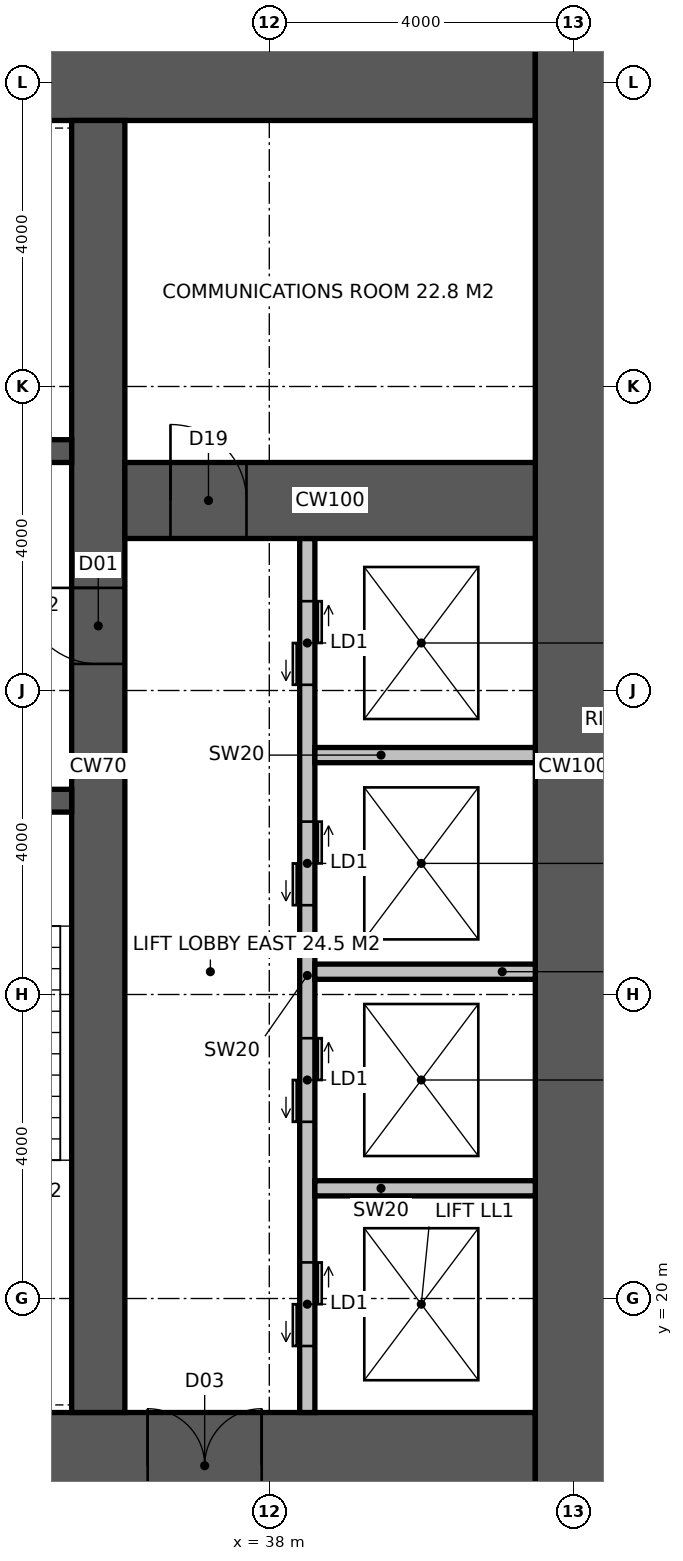
"""IFC4 building model, lengths in metres.
Left out: names, types, materials, properties, quantities, classifications, styles, units other than length and angle.
Written with IfcOpenShell. Run it as: python <this file> out.ifc"""

import sys

from ifc_helpers import new_model, si_unit, direction, frame, frame_2d, origin, place, context, subcontext, project, spatial, rectangle, extrude, element, fill, save


model = new_model("IFC4")
c1 = context("Model", 3, precision=1e-05, world=origin(), true_north=direction((0.0, 1.0)))
c2 = subcontext(c1, "Body", "Model", "MODEL_VIEW")
j1 = project(units=[si_unit("LENGTHUNIT", "METRE"), si_unit("PLANEANGLEUNIT", "RADIAN")], contexts=[c1])
p1 = place(None, origin())
s1 = spatial("IfcSite", under=j1, at=p1, CompositionType="ELEMENT")
p2 = place(p1, origin())
s2 = spatial("IfcBuilding", under=s1, at=p2, CompositionType="ELEMENT")
p3 = place(p2, frame((0.0, 0.0, 27.0)))
s3 = spatial("IfcBuildingStorey", under=s2, at=p3, CompositionType="ELEMENT", Elevation=27.0)
p4 = place(p3, frame((18.5, 17.8, -0.15), z_axis=(0.0, 0.0, 1.0), x_axis=(1.0, 0.0, 0.0)))
e1 = element("IfcWall", 1, at=p4, inside=s3, PredefinedType="SHEAR", context=c2, shape_type="SweptSolid", body=[
    extrude(rectangle(XDim=23.0, YDim=1.4, at=frame_2d((11.5, 0.0))), origin(), (0.0, 0.0, 1.0), 4.0),
])
p5 = place(p4, frame((3.45, 0.0, 0.15)))
e2 = element("IfcOpeningElement", 2, at=p5, cuts=e1, PredefinedType="OPENING", context=c2, shape_type="SweptSolid", body=[
    extrude(rectangle(XDim=1.5, YDim=2.4, at=frame_2d((0.75, 1.2))), frame((0.0, 0.71, 0.0), z_axis=(0.0, -1.0, 0.0), x_axis=(1.0, 0.0, 0.0)), (0.0, 0.0, 1.0), 1.42),
])
p6 = place(p4, frame((17.9, 0.0, 0.15)))
e3 = element("IfcOpeningElement", 3, at=p6, cuts=e1, PredefinedType="OPENING", context=c2, shape_type="SweptSolid", body=[
    extrude(rectangle(XDim=1.5, YDim=2.4, at=frame_2d((0.75, 1.2))), frame((0.0, 0.71, 0.0), z_axis=(0.0, -1.0, 0.0), x_axis=(1.0, 0.0, 0.0)), (0.0, 0.0, 1.0), 1.42),
])
p7 = place(p4, frame((0.9, 0.0, 0.15)))
e4 = element("IfcOpeningElement", 4, at=p7, cuts=e1, PredefinedType="OPENING", context=c2, shape_type="SweptSolid", body=[
    extrude(rectangle(XDim=1.0, YDim=2.2, at=frame_2d((0.5, 1.1))), frame((0.0, 0.71, 0.0), z_axis=(0.0, -1.0, 0.0), x_axis=(1.0, 0.0, 0.0)), (0.0, 0.0, 1.0), 1.42),
])
p8 = place(p3, frame((18.5, 36.2, -0.15), z_axis=(0.0, 0.0, 1.0), x_axis=(1.0, 0.0, 0.0)))
e5 = element("IfcWall", 5, at=p8, inside=s3, PredefinedType="SHEAR", context=c2, shape_type="SweptSolid", body=[
    extrude(rectangle(XDim=23.0, YDim=1.4, at=frame_2d((11.5, 0.0))), origin(), (0.0, 0.0, 1.0), 4.0),
])
p9 = place(p3, frame((42.0, 17.1, -0.15), z_axis=(0.0, 0.0, 1.0), x_axis=(0.0, 1.0, 0.0)))
e6 = element("IfcWall", 6, at=p9, inside=s3, PredefinedType="SHEAR", context=c2, shape_type="SweptSolid", body=[
    extrude(rectangle(XDim=19.8, YDim=1.0, at=frame_2d((9.9, 0.0))), origin(), (0.0, 0.0, 1.0), 4.0),
])
p10 = place(p3, frame((35.75, 18.5, -0.15), z_axis=(0.0, 0.0, 1.0), x_axis=(0.0, 1.0, 0.0)))
e7 = element("IfcWall", 7, at=p10, inside=s3, PredefinedType="SHEAR", context=c2, shape_type="SweptSolid", body=[
    extrude(rectangle(XDim=17.0, YDim=0.7, at=frame_2d((8.5, 0.0))), origin(), (0.0, 0.0, 1.0), 4.0),
])
p11 = place(p10, frame((9.85, 0.0, 0.15)))
e8 = element("IfcOpeningElement", 8, at=p11, cuts=e7, PredefinedType="OPENING", context=c2, shape_type="SweptSolid", body=[
    extrude(rectangle(XDim=1.0, YDim=2.2, at=frame_2d((0.5, 1.1))), frame((0.0, 0.36, 0.0), z_axis=(0.0, -1.0, 0.0), x_axis=(1.0, 0.0, 0.0)), (0.0, 0.0, 1.0), 0.72),
])
p12 = place(p3, frame((24.15, 26.55, -0.15), z_axis=(0.0, 0.0, 1.0), x_axis=(1.0, 0.0, 0.0)))
e9 = element("IfcWall", 9, at=p12, inside=s3, PredefinedType="SHEAR", context=c2, shape_type="SweptSolid", body=[
    extrude(rectangle(XDim=11.25, YDim=0.3, at=frame_2d((5.625, 0.0))), origin(), (0.0, 0.0, 1.0), 4.0),
])
p13 = place(p12, frame((9.25, 0.0, 0.15)))
e10 = element("IfcOpeningElement", 10, at=p13, cuts=e9, PredefinedType="OPENING", context=c2, shape_type="SweptSolid", body=[
    extrude(rectangle(XDim=1.0, YDim=2.2, at=frame_2d((0.5, 1.1))), frame((0.0, 0.16, 0.0), z_axis=(0.0, -1.0, 0.0), x_axis=(1.0, 0.0, 0.0)), (0.0, 0.0, 1.0), 0.32),
])
p14 = place(p12, frame((4.9, 0.0, 0.15)))
e11 = element("IfcOpeningElement", 11, at=p14, cuts=e9, PredefinedType="OPENING", context=c2, shape_type="SweptSolid", body=[
    extrude(rectangle(XDim=1.5, YDim=2.4, at=frame_2d((0.75, 1.2))), frame((0.0, 0.16, 0.0), z_axis=(0.0, -1.0, 0.0), x_axis=(1.0, 0.0, 0.0)), (0.0, 0.0, 1.0), 0.32),
])
p15 = place(p3, frame((24.15, 31.15, -0.15), z_axis=(0.0, 0.0, 1.0), x_axis=(1.0, 0.0, 0.0)))
e12 = element("IfcWall", 12, at=p15, inside=s3, PredefinedType="SHEAR", context=c2, shape_type="SweptSolid", body=[
    extrude(rectangle(XDim=11.25, YDim=0.3, at=frame_2d((5.625, 0.0))), origin(), (0.0, 0.0, 1.0), 4.0),
])
p16 = place(p15, frame((7.25, 0.0, 0.15)))
e13 = element("IfcOpeningElement", 13, at=p16, cuts=e12, PredefinedType="OPENING", context=c2, shape_type="SweptSolid", body=[
    extrude(rectangle(XDim=1.4, YDim=2.4, at=frame_2d((0.7, 1.2))), frame((0.0, 0.16, 0.0), z_axis=(0.0, -1.0, 0.0), x_axis=(1.0, 0.0, 0.0)), (0.0, 0.0, 1.0), 0.32),
])
p17 = place(p3, frame((38.5, 18.5, -0.15), z_axis=(0.0, 0.0, 1.0), x_axis=(0.0, 1.0, 0.0)))
e14 = element("IfcWall", 14, at=p17, inside=s3, PredefinedType="SOLIDWALL", context=c2, shape_type="SweptSolid", body=[
    extrude(rectangle(XDim=11.5, YDim=0.2, at=frame_2d((5.75, 0.0))), origin(), (0.0, 0.0, 1.0), 4.0),
])
p18 = place(p17, frame((0.875, 0.0, 0.15)))
e15 = element("IfcOpeningElement", 15, at=p18, cuts=e14, PredefinedType="OPENING", context=c2, shape_type="SweptSolid", body=[
    extrude(rectangle(XDim=1.1, YDim=2.2, at=frame_2d((0.55, 1.1))), frame((0.0, 0.11, 0.0), z_axis=(0.0, -1.0, 0.0), x_axis=(1.0, 0.0, 0.0)), (0.0, 0.0, 1.0), 0.22),
])
p19 = place(p17, frame((3.825, 0.0, 0.15)))
e16 = element("IfcOpeningElement", 16, at=p19, cuts=e14, PredefinedType="OPENING", context=c2, shape_type="SweptSolid", body=[
    extrude(rectangle(XDim=1.1, YDim=2.2, at=frame_2d((0.55, 1.1))), frame((0.0, 0.11, 0.0), z_axis=(0.0, -1.0, 0.0), x_axis=(1.0, 0.0, 0.0)), (0.0, 0.0, 1.0), 0.22),
])
p20 = place(p17, frame((6.675, 0.0, 0.15)))
e17 = element("IfcOpeningElement", 17, at=p20, cuts=e14, PredefinedType="OPENING", context=c2, shape_type="SweptSolid", body=[
    extrude(rectangle(XDim=1.1, YDim=2.2, at=frame_2d((0.55, 1.1))), frame((0.0, 0.11, 0.0), z_axis=(0.0, -1.0, 0.0), x_axis=(1.0, 0.0, 0.0)), (0.0, 0.0, 1.0), 0.22),
])
p21 = place(p17, frame((9.575, 0.0, 0.15)))
e18 = element("IfcOpeningElement", 18, at=p21, cuts=e14, PredefinedType="OPENING", context=c2, shape_type="SweptSolid", body=[
    extrude(rectangle(XDim=1.1, YDim=2.2, at=frame_2d((0.55, 1.1))), frame((0.0, 0.11, 0.0), z_axis=(0.0, -1.0, 0.0), x_axis=(1.0, 0.0, 0.0)), (0.0, 0.0, 1.0), 0.22),
])
p22 = place(p3, frame((36.1, 30.5, -0.15), z_axis=(0.0, 0.0, 1.0), x_axis=(1.0, 0.0, 0.0)))
e19 = element("IfcWall", 19, at=p22, inside=s3, PredefinedType="SHEAR", context=c2, shape_type="SweptSolid", body=[
    extrude(rectangle(XDim=5.4, YDim=1.0, at=frame_2d((2.7, 0.0))), origin(), (0.0, 0.0, 1.0), 4.0),
])
p23 = place(p22, frame((0.6, 0.0, 0.15)))
e20 = element("IfcOpeningElement", 20, at=p23, cuts=e19, PredefinedType="OPENING", context=c2, shape_type="SweptSolid", body=[
    extrude(rectangle(XDim=1.0, YDim=2.2, at=frame_2d((0.5, 1.1))), frame((0.0, 0.51, 0.0), z_axis=(0.0, -1.0, 0.0), x_axis=(1.0, 0.0, 0.0)), (0.0, 0.0, 1.0), 1.02),
])
for number, where, z_axis, x_axis in (
    (21, (38.6, 21.45, -0.15), (0.0, 0.0, 1.0), (1.0, 0.0, 0.0)),
    (22, (38.6, 24.3, -0.15), (0.0, 0.0, 1.0), (1.0, 0.0, 0.0)),
    (23, (38.6, 27.15, -0.15), (0.0, 0.0, 1.0), (1.0, 0.0, 0.0)),
):
    element("IfcWall", number, at=place(p3, frame(where, z_axis=z_axis, x_axis=x_axis)), inside=s3, PredefinedType="SOLIDWALL", context=c2, shape_type="SweptSolid", body=[
        extrude(rectangle(XDim=2.9, YDim=0.2, at=frame_2d((1.45, 0.0))), origin(), (0.0, 0.0, 1.0), 4.0),
    ])
p24 = place(p11, origin())
e24 = element("IfcDoor", 24, at=p24, inside=s3, OperationType="SINGLE_SWING_RIGHT", PredefinedType="DOOR", context=c2, shape_type="SweptSolid", body=[
    extrude(rectangle(XDim=1.0, YDim=2.2, at=frame_2d((0.5, 1.1))), frame((0.0, 0.025, 0.0), z_axis=(0.0, -1.0, 0.0), x_axis=(1.0, 0.0, 0.0)), (0.0, 0.0, 1.0), 0.05),
])
fill(e8, e24)
p25 = place(p6, origin())
e25 = element("IfcDoor", 25, at=p25, inside=s3, OperationType="DOUBLE_DOOR_DOUBLE_SWING", PredefinedType="DOOR", context=c2, shape_type="SweptSolid", body=[
    extrude(rectangle(XDim=1.5, YDim=2.4, at=frame_2d((0.75, 1.2))), frame((0.0, 0.025, 0.0), z_axis=(0.0, -1.0, 0.0), x_axis=(1.0, 0.0, 0.0)), (0.0, 0.0, 1.0), 0.05),
])
fill(e3, e25)
p26 = place(p23, origin())
e26 = element("IfcDoor", 26, at=p26, inside=s3, OperationType="SINGLE_SWING_LEFT", PredefinedType="DOOR", context=c2, shape_type="SweptSolid", body=[
    extrude(rectangle(XDim=1.0, YDim=2.2, at=frame_2d((0.5, 1.1))), frame((0.0, 0.025, 0.0), z_axis=(0.0, -1.0, 0.0), x_axis=(1.0, 0.0, 0.0)), (0.0, 0.0, 1.0), 0.05),
])
fill(e20, e26)
p27 = place(p18, origin())
e27 = element("IfcDoor", 27, at=p27, inside=s3, OperationType="DOUBLE_DOOR_SLIDING", PredefinedType="DOOR", context=c2, shape_type="SweptSolid", body=[
    extrude(rectangle(XDim=1.1, YDim=2.2, at=frame_2d((0.55, 1.1))), frame((0.0, 0.025, 0.0), z_axis=(0.0, -1.0, 0.0), x_axis=(1.0, 0.0, 0.0)), (0.0, 0.0, 1.0), 0.05),
])
fill(e15, e27)
p28 = place(p19, origin())
e28 = element("IfcDoor", 28, at=p28, inside=s3, OperationType="DOUBLE_DOOR_SLIDING", PredefinedType="DOOR", context=c2, shape_type="SweptSolid", body=[
    extrude(rectangle(XDim=1.1, YDim=2.2, at=frame_2d((0.55, 1.1))), frame((0.0, 0.025, 0.0), z_axis=(0.0, -1.0, 0.0), x_axis=(1.0, 0.0, 0.0)), (0.0, 0.0, 1.0), 0.05),
])
fill(e16, e28)
p29 = place(p20, origin())
e29 = element("IfcDoor", 29, at=p29, inside=s3, OperationType="DOUBLE_DOOR_SLIDING", PredefinedType="DOOR", context=c2, shape_type="SweptSolid", body=[
    extrude(rectangle(XDim=1.1, YDim=2.2, at=frame_2d((0.55, 1.1))), frame((0.0, 0.025, 0.0), z_axis=(0.0, -1.0, 0.0), x_axis=(1.0, 0.0, 0.0)), (0.0, 0.0, 1.0), 0.05),
])
fill(e17, e29)
p30 = place(p21, origin())
e30 = element("IfcDoor", 30, at=p30, inside=s3, OperationType="DOUBLE_DOOR_SLIDING", PredefinedType="DOOR", context=c2, shape_type="SweptSolid", body=[
    extrude(rectangle(XDim=1.1, YDim=2.2, at=frame_2d((0.55, 1.1))), frame((0.0, 0.025, 0.0), z_axis=(0.0, -1.0, 0.0), x_axis=(1.0, 0.0, 0.0)), (0.0, 0.0, 1.0), 0.05),
])
fill(e18, e30)
save(model, sys.argv[1])
